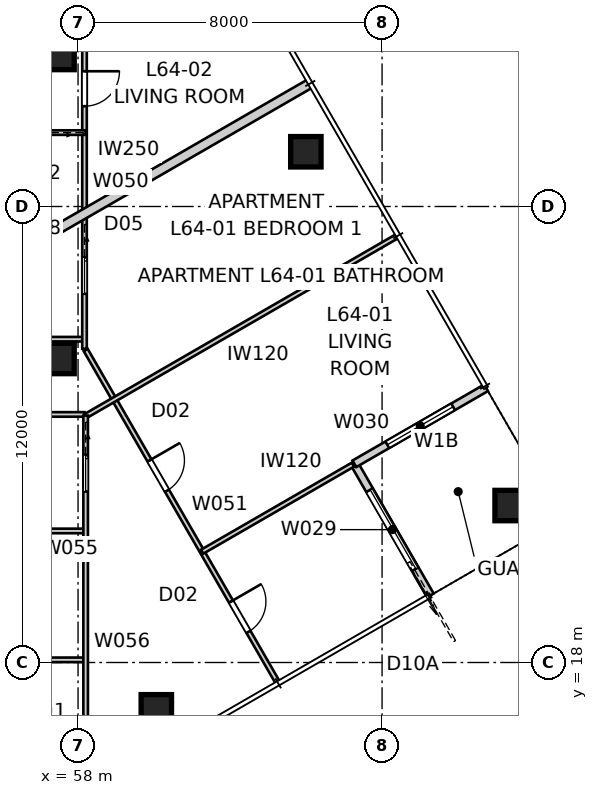
"""IFC4 building model, lengths in metres.
Left out: names, types, materials, properties, quantities, classifications, styles, units other than length and angle.
Written with IfcOpenShell. Run it as: python <this file> out.ifc"""

import sys

from ifc_helpers import new_model, si_unit, direction, frame, frame_2d, origin, origin_2d, place, context, subcontext, project, spatial, rectangle, extrude, element, fill, save


model = new_model("IFC4")
c1 = context("Model", 3, precision=1e-05, world=origin(), true_north=direction((0.0, 1.0)))
c2 = subcontext(c1, "Body", "Model", "MODEL_VIEW")
j1 = project(units=[si_unit("LENGTHUNIT", "METRE"), si_unit("PLANEANGLEUNIT", "RADIAN")], contexts=[c1])
p1 = place(None, origin())
s1 = spatial("IfcSite", under=j1, at=p1, CompositionType="ELEMENT")
p2 = place(p1, origin())
s2 = spatial("IfcBuilding", under=s1, at=p2, CompositionType="ELEMENT")
p3 = place(p2, frame((0.0, 0.0, 232.0)))
s3 = spatial("IfcBuildingStorey", under=s2, at=p3, CompositionType="ELEMENT", Elevation=232.0)
for number, where, z_axis, x_axis in (
    (1, (60.06, 16.755, 0.0), (0.0, 0.0, 1.0), (1.0, 0.0, 0.0)),
    (2, (69.37, 22.13, 0.0), (0.0, 0.0, 1.0), (1.0, 0.0, 0.0)),
    (3, (63.995, 31.44, 0.0), (0.0, 0.0, 1.0), (1.0, 0.0, 0.0)),
):
    element("IfcColumn", number, at=place(p3, frame(where, z_axis=z_axis, x_axis=x_axis)), inside=s3, PredefinedType="COLUMN", context=c2, shape_type="SweptSolid", body=[
        extrude(rectangle(XDim=0.8, YDim=0.8, at=origin_2d()), origin(), (0.0, 0.0, 1.0), 3.2),
    ])
for number, where, z_axis, x_axis in (
    (4, (57.5, 26.0, 0.0), (0.0, 0.0, 1.0), (1.0, 0.0, 0.0)),
    (5, (57.5, 34.0, 0.0), (0.0, 0.0, 1.0), (1.0, 0.0, 0.0)),
):
    element("IfcColumn", number, at=place(p3, frame(where, z_axis=z_axis, x_axis=x_axis)), inside=s3, PredefinedType="COLUMN", context=c2, shape_type="SweptSolid", body=[
        extrude(rectangle(XDim=0.8, YDim=0.8, at=origin_2d()), origin(), (0.0, 0.0, 1.0), 3.4),
    ])
p4 = place(p3, frame((67.271, 19.764, 0.0), z_axis=(0.0, 0.0, 1.0), x_axis=(-0.49999894854, 0.866026010844, 0.0)))
e6 = element("IfcWall", 6, at=p4, inside=s3, PredefinedType="SOLIDWALL", context=c2, shape_type="SweptSolid", body=[
    extrude(rectangle(XDim=4.0, YDim=0.2, at=frame_2d((2.0, 0.0))), origin(), (0.0, 0.0, 1.0), 3.2),
])
p5 = place(p4, frame((0.8, 0.0, 0.0)))
e7 = element("IfcOpeningElement", 7, at=p5, cuts=e6, PredefinedType="OPENING", context=c2, shape_type="SweptSolid", body=[
    extrude(rectangle(XDim=2.4, YDim=2.1, at=frame_2d((1.2, 1.05))), frame((0.0, 0.11, 0.0), z_axis=(0.0, -1.0, 0.0), x_axis=(1.0, 0.0, 0.0)), (0.0, 0.0, 1.0), 0.22),
])
p6 = place(p3, frame((65.271, 23.229, 0.0), z_axis=(0.0, 0.0, 1.0), x_axis=(0.866026010844, 0.49999894854, 0.0)))
e8 = element("IfcWall", 8, at=p6, inside=s3, PredefinedType="SOLIDWALL", context=c2, shape_type="SweptSolid", body=[
    extrude(rectangle(XDim=4.0, YDim=0.2, at=frame_2d((2.0, 0.0))), origin(), (0.0, 0.0, 1.0), 3.2),
])
p7 = place(p6, frame((1.0, 0.0, 0.4)))
e9 = element("IfcOpeningElement", 9, at=p7, cuts=e8, PredefinedType="OPENING", context=c2, shape_type="SweptSolid", body=[
    extrude(rectangle(XDim=2.0, YDim=1.8, at=frame_2d((1.0, 0.9))), frame((0.0, 0.11, 0.0), z_axis=(0.0, -1.0, 0.0), x_axis=(1.0, 0.0, 0.0)), (0.0, 0.0, 1.0), 0.22),
])
p8 = place(p3, frame((64.111, 33.239, 0.0), z_axis=(0.0, 0.0, 1.0), x_axis=(-0.866024190901, -0.50000210077, 0.0)))
e10 = element("IfcWall", 10, at=p8, inside=s3, PredefinedType="PARTITIONING", context=c2, shape_type="SweptSolid", body=[
    extrude(rectangle(XDim=10.026, YDim=0.25, at=frame_2d((5.013, 0.0))), origin(), (0.0, 0.0, 1.0), 3.2),
])
p9 = place(p3, frame((55.43, 26.508, 0.0), z_axis=(0.0, 0.0, 1.0), x_axis=(1.0, 0.0, 0.0)))
e11 = element("IfcWall", 11, at=p9, inside=s3, PredefinedType="PARTITIONING", context=c2, shape_type="SweptSolid", body=[
    extrude(rectangle(XDim=2.74, YDim=0.12, at=frame_2d((1.37, 0.0))), origin(), (0.0, 0.0, 1.0), 3.2),
])
p10 = place(p9, frame((0.59, 0.0, 0.0)))
e12 = element("IfcOpeningElement", 12, at=p10, cuts=e11, PredefinedType="OPENING", context=c2, shape_type="SweptSolid", body=[
    extrude(rectangle(XDim=0.96, YDim=2.1, at=frame_2d((0.48, 1.05))), frame((0.0, 0.07, 0.0), z_axis=(0.0, -1.0, 0.0), x_axis=(1.0, 0.0, 0.0)), (0.0, 0.0, 1.0), 0.14),
])
p11 = place(p3, frame((58.17, 24.528, 0.0), z_axis=(0.0, 0.0, 1.0), x_axis=(-1.0, 0.0, 0.0)))
e13 = element("IfcWall", 13, at=p11, inside=s3, PredefinedType="PARTITIONING", context=c2, shape_type="SweptSolid", body=[
    extrude(rectangle(XDim=6.04, YDim=0.12, at=frame_2d((3.02, 0.0))), origin(), (0.0, 0.0, 1.0), 2.3),
])
p12 = place(p11, frame((2.54, 0.0, 0.0)))
e14 = element("IfcOpeningElement", 14, at=p12, cuts=e13, PredefinedType="OPENING", context=c2, shape_type="SweptSolid", body=[
    extrude(rectangle(XDim=0.96, YDim=2.1, at=frame_2d((0.48, 1.05))), frame((0.0, 0.07, 0.0), z_axis=(0.0, -1.0, 0.0), x_axis=(1.0, 0.0, 0.0)), (0.0, 0.0, 1.0), 0.14),
])
p13 = place(p3, frame((58.171, 40.491, 0.0), z_axis=(0.0, 0.0, 1.0), x_axis=(-5.1455328e-05, -0.999999998676, 0.0)))
e15 = element("IfcWall", 15, at=p13, inside=s3, PredefinedType="PARTITIONING", context=c2, shape_type="SweptSolid", body=[
    extrude(rectangle(XDim=14.234, YDim=0.12, at=frame_2d((7.117, 0.0))), origin(), (0.0, 0.0, 1.0), 3.2),
])
p14 = place(p13, frame((6.932, 0.0, 0.0)))
e16 = element("IfcOpeningElement", 16, at=p14, cuts=e15, PredefinedType="OPENING", context=c2, shape_type="SweptSolid", body=[
    extrude(rectangle(XDim=0.92, YDim=2.34, at=frame_2d((0.46, 1.17))), frame((0.0, 0.07, 0.0), z_axis=(0.0, -1.0, 0.0), x_axis=(1.0, 0.0, 0.0)), (0.0, 0.0, 1.0), 0.14),
])
p15 = place(p13, frame((11.829, 0.0, 0.0)))
e17 = element("IfcOpeningElement", 17, at=p15, cuts=e15, PredefinedType="OPENING", context=c2, shape_type="SweptSolid", body=[
    extrude(rectangle(XDim=0.96, YDim=2.1, at=frame_2d((0.48, 1.05))), frame((0.0, 0.07, 0.0), z_axis=(0.0, -1.0, 0.0), x_axis=(1.0, 0.0, 0.0)), (0.0, 0.0, 1.0), 0.14),
])
p16 = place(p13, frame((2.174, 0.0, 0.0)))
e18 = element("IfcOpeningElement", 18, at=p16, cuts=e15, PredefinedType="OPENING", context=c2, shape_type="SweptSolid", body=[
    extrude(rectangle(XDim=0.96, YDim=2.1, at=frame_2d((0.48, 1.05))), frame((0.0, 0.07, 0.0), z_axis=(0.0, -1.0, 0.0), x_axis=(1.0, 0.0, 0.0)), (0.0, 0.0, 1.0), 0.14),
])
p17 = place(p3, frame((58.2, 26.226, 0.0), z_axis=(0.0, 0.0, 1.0), x_axis=(0.499992604493, -0.86602967354, 0.0)))
e19 = element("IfcWall", 19, at=p17, inside=s3, PredefinedType="PARTITIONING", context=c2, shape_type="SweptSolid", body=[
    extrude(rectangle(XDim=10.092, YDim=0.12, at=frame_2d((5.046, 0.0))), origin(), (0.0, 0.0, 1.0), 3.2),
])
p18 = place(p17, frame((3.359, 0.0, 0.0)))
e20 = element("IfcOpeningElement", 20, at=p18, cuts=e19, PredefinedType="OPENING", context=c2, shape_type="SweptSolid", body=[
    extrude(rectangle(XDim=0.92, YDim=2.34, at=frame_2d((0.46, 1.17))), frame((0.0, 0.07, 0.0), z_axis=(0.0, -1.0, 0.0), x_axis=(1.0, 0.0, 0.0)), (0.0, 0.0, 1.0), 0.14),
])
p19 = place(p17, frame((7.646, 0.0, 0.0)))
e21 = element("IfcOpeningElement", 21, at=p19, cuts=e19, PredefinedType="OPENING", context=c2, shape_type="SweptSolid", body=[
    extrude(rectangle(XDim=0.92, YDim=2.34, at=frame_2d((0.46, 1.17))), frame((0.0, 0.07, 0.0), z_axis=(0.0, -1.0, 0.0), x_axis=(1.0, 0.0, 0.0)), (0.0, 0.0, 1.0), 0.14),
])
p20 = place(p3, frame((66.388, 29.214, 0.0), z_axis=(0.0, 0.0, 1.0), x_axis=(-0.86602907136, -0.49999364752, 0.0)))
e22 = element("IfcWall", 22, at=p20, inside=s3, PredefinedType="PARTITIONING", context=c2, shape_type="SweptSolid", body=[
    extrude(rectangle(XDim=9.455, YDim=0.12, at=frame_2d((4.728, 0.0))), origin(), (0.0, 0.0, 1.0), 3.2),
])
p21 = place(p3, frame((58.2, 18.07, 0.0), z_axis=(0.0, 0.0, 1.0), x_axis=(-1.0, 0.0, 0.0)))
e23 = element("IfcWall", 23, at=p21, inside=s3, PredefinedType="PARTITIONING", context=c2, shape_type="SweptSolid", body=[
    extrude(rectangle(XDim=5.381, YDim=0.12, at=frame_2d((2.691, 0.0))), origin(), (0.0, 0.0, 1.0), 3.2),
])
p22 = place(p21, frame((2.211, 0.0, 0.0)))
e24 = element("IfcOpeningElement", 24, at=p22, cuts=e23, PredefinedType="OPENING", context=c2, shape_type="SweptSolid", body=[
    extrude(rectangle(XDim=0.96, YDim=2.1, at=frame_2d((0.48, 1.05))), frame((0.0, 0.07, 0.0), z_axis=(0.0, -1.0, 0.0), x_axis=(1.0, 0.0, 0.0)), (0.0, 0.0, 1.0), 0.14),
])
p23 = place(p3, frame((52.1, 21.462, 0.0), z_axis=(0.0, 0.0, 1.0), x_axis=(1.0, 0.0, 0.0)))
e25 = element("IfcWall", 25, at=p23, inside=s3, PredefinedType="PARTITIONING", context=c2, shape_type="SweptSolid", body=[
    extrude(rectangle(XDim=6.1, YDim=0.12, at=frame_2d((3.05, 0.0))), origin(), (0.0, 0.0, 1.0), 3.2),
])
p24 = place(p23, frame((2.42, 0.0, 0.0)))
e26 = element("IfcOpeningElement", 26, at=p24, cuts=e25, PredefinedType="OPENING", context=c2, shape_type="SweptSolid", body=[
    extrude(rectangle(XDim=0.96, YDim=2.1, at=frame_2d((0.48, 1.05))), frame((0.0, 0.07, 0.0), z_axis=(0.0, -1.0, 0.0), x_axis=(1.0, 0.0, 0.0)), (0.0, 0.0, 1.0), 0.14),
])
p25 = place(p3, frame((58.2, 24.498, 0.0), z_axis=(0.0, 0.0, 1.0), x_axis=(0.0, -1.0, 0.0)))
e27 = element("IfcWall", 27, at=p25, inside=s3, PredefinedType="PARTITIONING", context=c2, shape_type="SweptSolid", body=[
    extrude(rectangle(XDim=9.925, YDim=0.12, at=frame_2d((4.962, 0.0))), origin(), (0.0, 0.0, 1.0), 3.2),
])
p26 = place(p25, frame((1.038, 0.0, 0.0)))
e28 = element("IfcOpeningElement", 28, at=p26, cuts=e27, PredefinedType="OPENING", context=c2, shape_type="SweptSolid", body=[
    extrude(rectangle(XDim=0.96, YDim=2.1, at=frame_2d((0.48, 1.05))), frame((0.0, 0.07, 0.0), z_axis=(0.0, -1.0, 0.0), x_axis=(1.0, 0.0, 0.0)), (0.0, 0.0, 1.0), 0.14),
])
p27 = place(p3, frame((65.237, 23.208, 0.0), z_axis=(0.0, 0.0, 1.0), x_axis=(-0.866025975094, -0.499999010461, 0.0)))
e29 = element("IfcWall", 29, at=p27, inside=s3, PredefinedType="PARTITIONING", context=c2, shape_type="SweptSolid", body=[
    extrude(rectangle(XDim=4.585, YDim=0.12, at=frame_2d((2.292, 0.0))), origin(), (0.0, 0.0, 1.0), 3.2),
])
p28 = place(p3, frame((58.2, 31.945, 0.0), z_axis=(0.0, 0.0, 1.0), x_axis=(-1.0, 0.0, 0.0)))
e30 = element("IfcWall", 30, at=p28, inside=s3, PredefinedType="PARTITIONING", context=c2, shape_type="SweptSolid", body=[
    extrude(rectangle(XDim=2.8, YDim=0.12, at=frame_2d((1.4, 0.0))), origin(), (0.0, 0.0, 1.0), 3.2),
])
p29 = place(p28, frame((0.92, 0.0, 0.0)))
e31 = element("IfcOpeningElement", 31, at=p29, cuts=e30, PredefinedType="OPENING", context=c2, shape_type="SweptSolid", body=[
    extrude(rectangle(XDim=0.96, YDim=2.1, at=frame_2d((0.48, 1.05))), frame((0.0, 0.07, 0.0), z_axis=(0.0, -1.0, 0.0), x_axis=(1.0, 0.0, 0.0)), (0.0, 0.0, 1.0), 0.14),
])
p30 = place(p5, origin())
e32 = element("IfcDoor", 32, at=p30, inside=s3, OperationType="SLIDING_TO_LEFT", PredefinedType="DOOR", context=c2, shape_type="SweptSolid", body=[
    extrude(rectangle(XDim=2.4, YDim=2.1, at=frame_2d((1.2, 1.05))), frame((0.0, 0.025, 0.0), z_axis=(0.0, -1.0, 0.0), x_axis=(1.0, 0.0, 0.0)), (0.0, 0.0, 1.0), 0.05),
])
fill(e7, e32)
p31 = place(p7, origin())
e33 = element("IfcWindow", 33, at=p31, inside=s3, PartitioningType="SINGLE_PANEL", PredefinedType="WINDOW", context=c2, shape_type="SweptSolid", body=[
    extrude(rectangle(XDim=2.0, YDim=1.8, at=frame_2d((1.0, 0.9))), frame((0.0, 0.03, 0.0), z_axis=(0.0, -1.0, 0.0), x_axis=(1.0, 0.0, 0.0)), (0.0, 0.0, 1.0), 0.06),
])
fill(e9, e33)
p32 = place(p14, origin())
e34 = element("IfcDoor", 34, at=p32, inside=s3, OperationType="SINGLE_SWING_LEFT", PredefinedType="DOOR", context=c2, shape_type="SweptSolid", body=[
    extrude(rectangle(XDim=0.92, YDim=2.34, at=frame_2d((0.46, 1.17))), frame((0.0, 0.025, 0.0), z_axis=(0.0, -1.0, 0.0), x_axis=(1.0, 0.0, 0.0)), (0.0, 0.0, 1.0), 0.05),
])
fill(e16, e34)
p33 = place(p26, origin())
e35 = element("IfcDoor", 35, at=p33, inside=s3, OperationType="SLIDING_TO_LEFT", PredefinedType="DOOR", context=c2, shape_type="SweptSolid", body=[
    extrude(rectangle(XDim=0.96, YDim=2.1, at=frame_2d((0.48, 1.05))), frame((0.0, 0.025, 0.0), z_axis=(0.0, -1.0, 0.0), x_axis=(1.0, 0.0, 0.0)), (0.0, 0.0, 1.0), 0.05),
])
fill(e28, e35)
p34 = place(p15, origin())
e36 = element("IfcDoor", 36, at=p34, inside=s3, OperationType="SLIDING_TO_LEFT", PredefinedType="DOOR", context=c2, shape_type="SweptSolid", body=[
    extrude(rectangle(XDim=0.96, YDim=2.1, at=frame_2d((0.48, 1.05))), frame((0.0, 0.025, 0.0), z_axis=(0.0, -1.0, 0.0), x_axis=(1.0, 0.0, 0.0)), (0.0, 0.0, 1.0), 0.05),
])
fill(e17, e36)
p35 = place(p18, origin())
e37 = element("IfcDoor", 37, at=p35, inside=s3, OperationType="SINGLE_SWING_LEFT", PredefinedType="DOOR", context=c2, shape_type="SweptSolid", body=[
    extrude(rectangle(XDim=0.92, YDim=2.34, at=frame_2d((0.46, 1.17))), frame((0.0, 0.025, 0.0), z_axis=(0.0, -1.0, 0.0), x_axis=(1.0, 0.0, 0.0)), (0.0, 0.0, 1.0), 0.05),
])
fill(e20, e37)
p36 = place(p19, origin())
e38 = element("IfcDoor", 38, at=p36, inside=s3, OperationType="SINGLE_SWING_LEFT", PredefinedType="DOOR", context=c2, shape_type="SweptSolid", body=[
    extrude(rectangle(XDim=0.92, YDim=2.34, at=frame_2d((0.46, 1.17))), frame((0.0, 0.025, 0.0), z_axis=(0.0, -1.0, 0.0), x_axis=(1.0, 0.0, 0.0)), (0.0, 0.0, 1.0), 0.05),
])
fill(e21, e38)
save(model, sys.argv[1])
